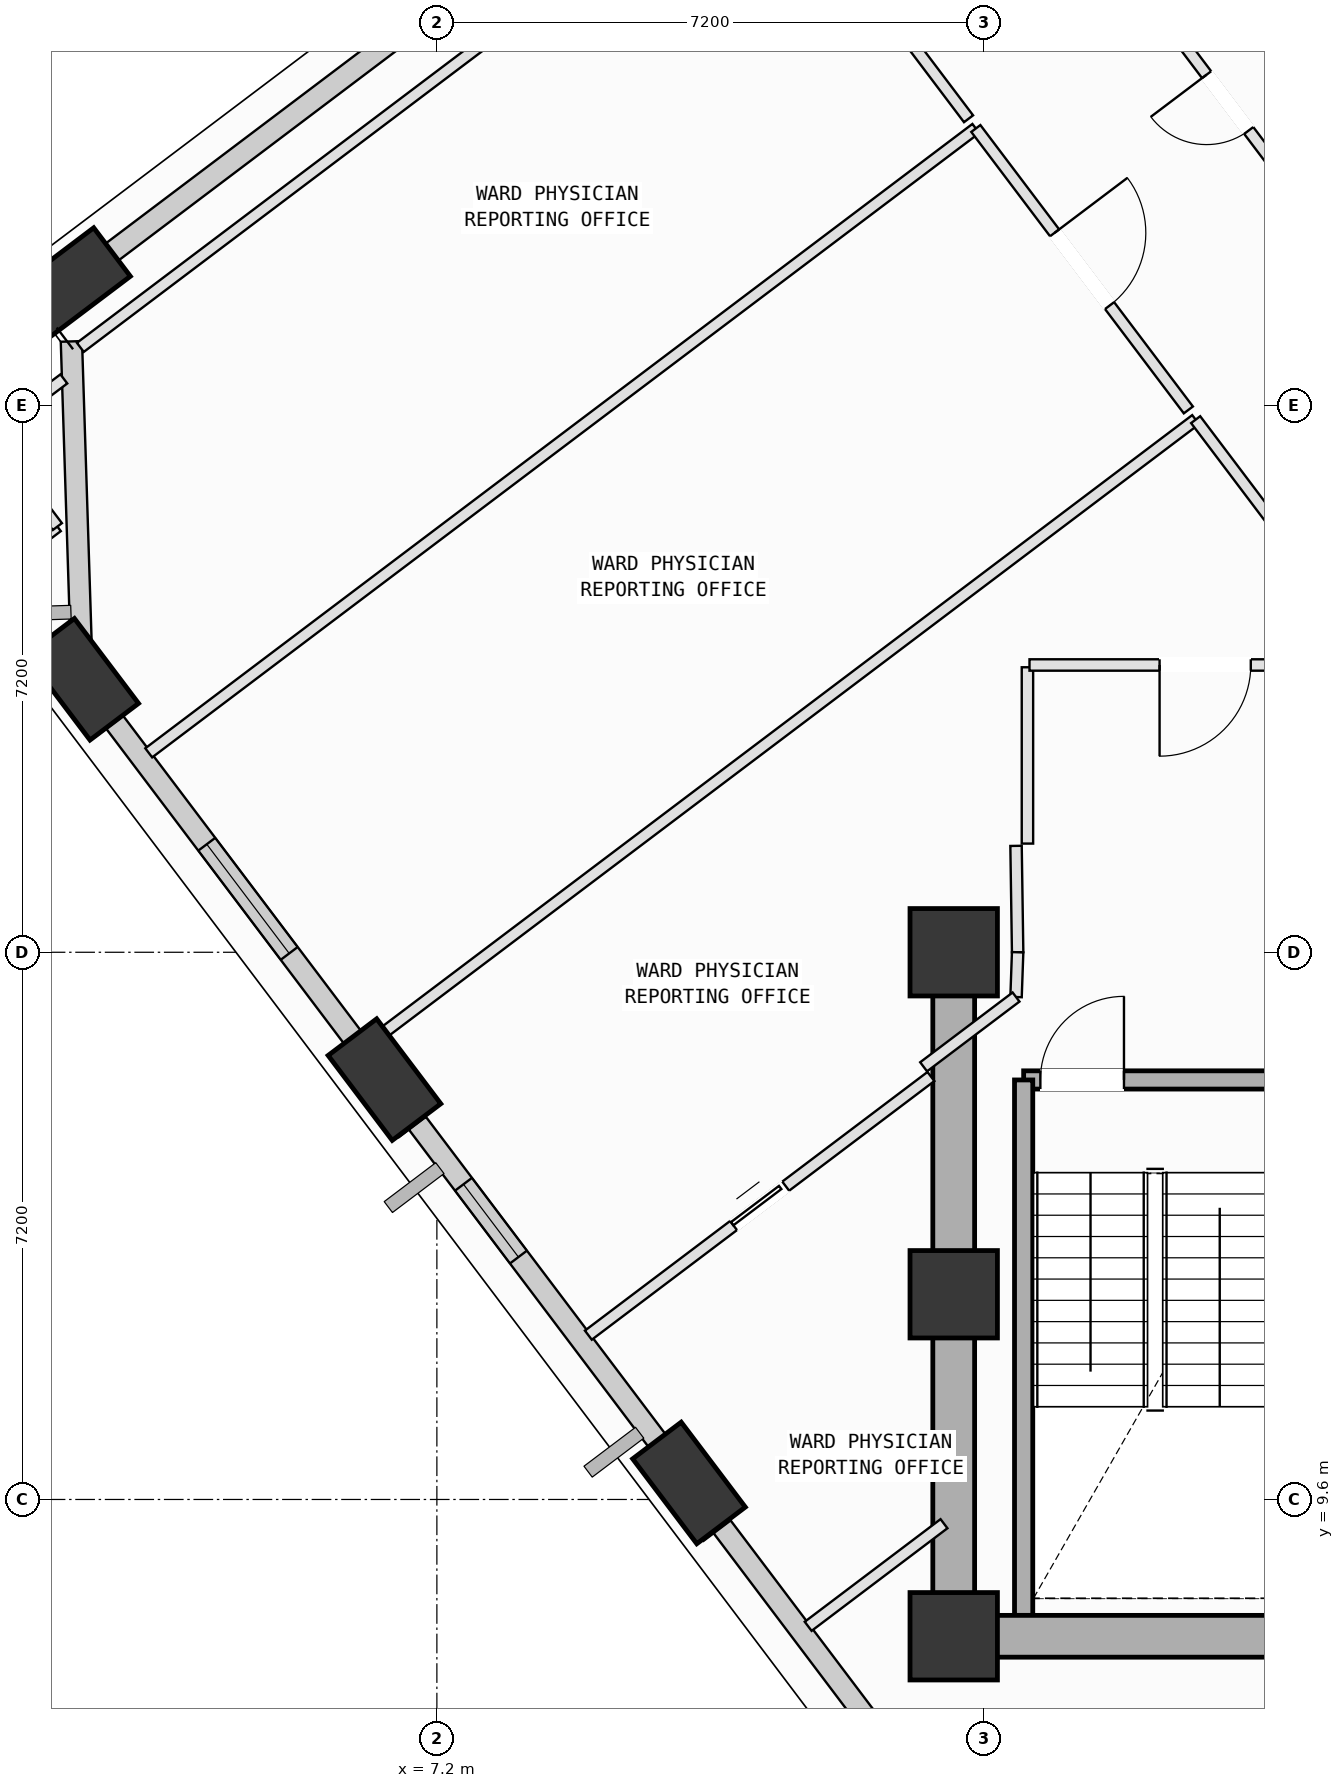
"""IFC4 building model, lengths in metres.
Left out: names, types, materials, properties, quantities, classifications, styles, units other than length and angle.
Written with IfcOpenShell. Run it as: python <this file> out.ifc"""

import sys

from ifc_helpers import new_model, si_unit, direction, frame, frame_2d, origin, origin_2d, place, context, subcontext, project, spatial, rectangle, extrude, element, fill, save


model = new_model("IFC4")
c1 = context("Model", 3, precision=1e-05, world=origin(), true_north=direction((0.0, 1.0)))
c2 = subcontext(c1, "Body", "Model", "MODEL_VIEW")
j1 = project(units=[si_unit("LENGTHUNIT", "METRE"), si_unit("PLANEANGLEUNIT", "RADIAN")], contexts=[c1])
p1 = place(None, origin())
s1 = spatial("IfcSite", under=j1, at=p1, CompositionType="ELEMENT")
p2 = place(p1, origin())
s2 = spatial("IfcBuilding", under=s1, at=p2, CompositionType="ELEMENT")
p3 = place(p2, frame((0.0, 0.0, 181.8)))
s3 = spatial("IfcBuildingStorey", under=s2, at=p3, CompositionType="ELEMENT", Elevation=181.8)
for number, where, z_axis, x_axis in (
    (1, (14.0, 7.8, 0.0), (0.0, 0.0, 1.0), (1.0, 0.0, 0.0)),
    (2, (14.0, 12.3, 0.0), (0.0, 0.0, 1.0), (1.0, 0.0, 0.0)),
    (3, (14.0, 16.8, 0.0), (0.0, 0.0, 1.0), (1.0, 0.0, 0.0)),
):
    element("IfcColumn", number, at=place(p3, frame(where, z_axis=z_axis, x_axis=x_axis)), inside=s3, PredefinedType="COLUMN", context=c2, shape_type="SweptSolid", body=[
        extrude(rectangle(XDim=1.15, YDim=1.15, at=origin_2d()), origin(), (0.0, 0.0, 1.0), 4.0),
    ])
p4 = place(p3, frame((2.367, 25.592, 0.002), z_axis=(-0.002181074788, -0.128380485457, 0.991722589168), x_axis=(0.808144834717, 0.583881033112, 0.077361911126)))
e4 = element("IfcColumn", 4, at=p4, inside=s3, PredefinedType="COLUMN", context=c2, shape_type="SweptSolid", body=[
    extrude(rectangle(XDim=1.4, YDim=0.8, at=origin_2d()), origin(), (0.0, 0.0, 1.0), 4.03),
])
p5 = place(p3, frame((2.534, 20.392, 0.002), z_axis=(0.019204163449, -0.127522915018, 0.991649689281), x_axis=(-0.713651640755, 0.692898113321, 0.102924925082)))
e5 = element("IfcColumn", 5, at=p5, inside=s3, PredefinedType="COLUMN", context=c2, shape_type="SweptSolid", body=[
    extrude(rectangle(XDim=1.4, YDim=0.8, at=origin_2d()), origin(), (0.0, 0.0, 1.0), 4.03),
])
p6 = place(p3, frame((6.51, 15.125, 0.002), z_axis=(0.040764575419, -0.111131997272, 0.992969248554), x_axis=(-0.838574209491, 0.536533215554, 0.094474355164)))
e6 = element("IfcColumn", 6, at=p6, inside=s3, PredefinedType="COLUMN", context=c2, shape_type="SweptSolid", body=[
    extrude(rectangle(XDim=1.4, YDim=0.8, at=origin_2d()), origin(), (0.0, 0.0, 1.0), 4.025),
])
p7 = place(p3, frame((10.517, 9.817, 0.002), z_axis=(0.062518185007, -0.094566341982, 0.993553563482), x_axis=(-0.939913893398, 0.329204870009, 0.090476663063)))
e7 = element("IfcColumn", 7, at=p7, inside=s3, PredefinedType="COLUMN", context=c2, shape_type="SweptSolid", body=[
    extrude(rectangle(XDim=1.4, YDim=0.8, at=origin_2d()), origin(), (0.0, 0.0, 1.0), 4.022),
])
p8 = place(p3, frame((16.791, 32.892, 0.0), z_axis=(0.0, 0.0, 1.0), x_axis=(0.602494608464, -0.798122952165, 0.0)))
e8 = element("IfcWall", 8, at=p8, inside=s3, PredefinedType="SOLIDWALL", context=c2, shape_type="SweptSolid", body=[
    extrude(rectangle(XDim=6.96, YDim=0.24, at=frame_2d((3.48, 0.0))), origin(), (0.0, 0.0, 1.0), 3.265),
])
p9 = place(p8, frame((3.82, 0.0, 0.0)))
e9 = element("IfcOpeningElement", 9, at=p9, cuts=e8, PredefinedType="OPENING", context=c2, shape_type="SweptSolid", body=[
    extrude(rectangle(XDim=1.1, YDim=2.15, at=frame_2d((0.55, 1.075))), frame((0.0, 0.13, 0.0), z_axis=(0.0, -1.0, 0.0), x_axis=(1.0, 0.0, 0.0)), (0.0, 0.0, 1.0), 0.26),
])
p10 = place(p3, frame((2.601, 25.768, 0.0), z_axis=(0.0, 0.0, 1.0), x_axis=(0.798118156469, 0.602500961256, 0.0)))
e10 = element("IfcWall", 10, at=p10, inside=s3, PredefinedType="SOLIDWALL", context=c2, shape_type="SweptSolid", body=[
    extrude(rectangle(XDim=7.27, YDim=0.28, at=frame_2d((3.635, 0.0))), origin(), (0.0, 0.0, 1.0), 3.265),
])
p11 = place(p3, frame((2.526, 20.629, 0.0), z_axis=(0.0, 0.0, 1.0), x_axis=(-0.031949799886, 0.999489474826, 0.0)))
e11 = element("IfcWall", 11, at=p11, inside=s3, PredefinedType="SOLIDWALL", context=c2, shape_type="SweptSolid", body=[
    extrude(rectangle(XDim=4.21, YDim=0.28, at=frame_2d((2.105, 0.0))), origin(), (0.0, 0.0, 1.0), 3.265),
])
p12 = place(p3, frame((6.352, 15.335, 0.0), z_axis=(0.0, 0.0, 1.0), x_axis=(-0.602530491205, 0.798095863395, 0.0)))
e12 = element("IfcWall", 12, at=p12, inside=s3, PredefinedType="SOLIDWALL", context=c2, shape_type="SweptSolid", body=[
    extrude(rectangle(XDim=5.628, YDim=0.28, at=frame_2d((2.814, 0.0))), origin(), (0.0, 0.0, 1.0), 3.265),
])
p13 = place(p12, frame((1.817, 0.0, 0.75)))
e13 = element("IfcOpeningElement", 13, at=p13, cuts=e12, PredefinedType="OPENING", context=c2, shape_type="SweptSolid", body=[
    extrude(rectangle(XDim=1.8, YDim=2.05, at=frame_2d((0.9, 1.025))), frame((0.0, 0.15, 0.0), z_axis=(0.0, -1.0, 0.0), x_axis=(1.0, 0.0, 0.0)), (0.0, 0.0, 1.0), 0.3),
])
p14 = place(p3, frame((10.355, 10.031, 0.0), z_axis=(0.0, 0.0, 1.0), x_axis=(-0.602494498612, 0.79812303509, 0.0)))
e14 = element("IfcWall", 14, at=p14, inside=s3, PredefinedType="SOLIDWALL", context=c2, shape_type="SweptSolid", body=[
    extrude(rectangle(XDim=5.662, YDim=0.28, at=frame_2d((2.831, 0.0))), origin(), (0.0, 0.0, 1.0), 3.265),
])
p15 = place(p14, frame((3.456, 0.0, 0.75)))
e15 = element("IfcOpeningElement", 15, at=p15, cuts=e14, PredefinedType="OPENING", context=c2, shape_type="SweptSolid", body=[
    extrude(rectangle(XDim=1.2, YDim=1.75, at=frame_2d((0.6, 0.875))), frame((0.0, 0.15, 0.0), z_axis=(0.0, -1.0, 0.0), x_axis=(1.0, 0.0, 0.0)), (0.0, 0.0, 1.0), 0.3),
])
p16 = place(p3, frame((15.388, 3.365, 0.0), z_axis=(0.0, 0.0, 1.0), x_axis=(-0.602528511306, 0.798097358136, 0.0)))
e16 = element("IfcWall", 16, at=p16, inside=s3, PredefinedType="SOLIDWALL", context=c2, shape_type="SweptSolid", body=[
    extrude(rectangle(XDim=7.36, YDim=0.28, at=frame_2d((3.68, 0.0))), origin(), (0.0, 0.0, 1.0), 3.065),
])
p17 = place(p16, frame((2.514, 0.0, 0.75)))
e17 = element("IfcOpeningElement", 17, at=p17, cuts=e16, PredefinedType="OPENING", context=c2, shape_type="SweptSolid", body=[
    extrude(rectangle(XDim=1.6, YDim=1.95, at=frame_2d((0.8, 0.975))), frame((0.0, 0.15, 0.0), z_axis=(0.0, -1.0, 0.0), x_axis=(1.0, 0.0, 0.0)), (0.0, 0.0, 1.0), 0.3),
])
p18 = place(p3, frame((14.92, 15.12, 0.0), z_axis=(0.0, 0.0, 1.0), x_axis=(1.0, 0.0, 0.0)))
e18 = element("IfcWall", 18, at=p18, inside=s3, PredefinedType="SOLIDWALL", context=c2, shape_type="SweptSolid", body=[
    extrude(rectangle(XDim=3.46, YDim=0.24, at=frame_2d((1.73, 0.0))), origin(), (0.0, 0.0, 1.0), 3.78),
])
p19 = place(p18, frame((0.22, 0.0, 0.0)))
e19 = element("IfcOpeningElement", 19, at=p19, cuts=e18, PredefinedType="OPENING", context=c2, shape_type="SweptSolid", body=[
    extrude(rectangle(XDim=1.1, YDim=2.15, at=frame_2d((0.55, 1.075))), frame((0.0, 0.13, 0.0), z_axis=(0.0, -1.0, 0.0), x_axis=(1.0, 0.0, 0.0)), (0.0, 0.0, 1.0), 0.26),
])
p20 = place(p3, frame((14.92, 8.075, 0.0), z_axis=(0.0, 0.0, 1.0), x_axis=(0.0, 1.0, 0.0)))
e20 = element("IfcWall", 20, at=p20, inside=s3, PredefinedType="SOLIDWALL", context=c2, shape_type="SweptSolid", body=[
    extrude(rectangle(XDim=7.045, YDim=0.24, at=frame_2d((3.522, 0.0))), origin(), (0.0, 0.0, 1.0), 3.78),
])
p21 = place(p3, frame((14.0, 7.8, 0.0), z_axis=(0.0, 0.0, 1.0), x_axis=(1.0, 0.0, 0.0)))
e21 = element("IfcWall", 21, at=p21, inside=s3, PredefinedType="SHEAR", context=c2, shape_type="SweptSolid", body=[
    extrude(rectangle(XDim=10.8, YDim=0.55, at=frame_2d((5.4, 0.0))), origin(), (0.0, 0.0, 1.0), 3.78),
])
p22 = place(p3, frame((14.0, 16.8, 0.0), z_axis=(0.0, 0.0, 1.0), x_axis=(0.0, -1.0, 0.0)))
e22 = element("IfcWall", 22, at=p22, inside=s3, PredefinedType="SHEAR", context=c2, shape_type="SweptSolid", body=[
    extrude(rectangle(XDim=9.0, YDim=0.55, at=frame_2d((4.5, 0.0))), origin(), (0.0, 0.0, 1.0), 3.78),
])
p23 = place(p3, frame((12.085, 7.931, 0.0), z_axis=(0.0, 0.0, 1.0), x_axis=(0.79790227483, 0.602786827843, 0.0)))
e23 = element("IfcWall", 23, at=p23, inside=s3, PredefinedType="PARTITIONING", context=c2, shape_type="SweptSolid", body=[
    extrude(rectangle(XDim=2.24, YDim=0.15, at=frame_2d((1.12, 0.0))), origin(), (0.0, 0.0, 1.0), 3.78),
])
p24 = place(p3, frame((10.769, 9.101, 0.0), z_axis=(0.0, 0.0, 1.0), x_axis=(-0.601888920392, 0.798579819122, 0.0)))
e24 = element("IfcWall", 24, at=p24, inside=s3, PredefinedType="PARTITIONING", context=c2, shape_type="SweptSolid", body=[
    extrude(rectangle(XDim=0.992, YDim=0.15, at=frame_2d((0.496, 0.0))), origin(), (0.0, 0.0, 1.0), 3.265),
])
p25 = place(p3, frame((9.193, 11.762, 0.0), z_axis=(0.0, 0.0, 1.0), x_axis=(0.798045187467, 0.602597609323, 0.0)))
e25 = element("IfcWall", 25, at=p25, inside=s3, PredefinedType="PARTITIONING", context=c2, shape_type="SweptSolid", body=[
    extrude(rectangle(XDim=5.647, YDim=0.15, at=frame_2d((2.824, 0.0))), origin(), (0.0, 0.0, 1.0), 3.78),
])
p26 = place(p25, frame((2.394, 0.0, 0.0)))
e26 = element("IfcOpeningElement", 26, at=p26, cuts=e25, PredefinedType="OPENING", context=c2, shape_type="SweptSolid", body=[
    extrude(rectangle(XDim=0.86, YDim=2.06, at=frame_2d((0.43, 1.03))), frame((0.0, 0.085, 0.0), z_axis=(0.0, -1.0, 0.0), x_axis=(1.0, 0.0, 0.0)), (0.0, 0.0, 1.0), 0.17),
])
p27 = place(p3, frame((14.97, 20.55, 0.0), z_axis=(0.0, 0.0, 1.0), x_axis=(0.0, -1.0, 0.0)))
e27 = element("IfcWall", 27, at=p27, inside=s3, PredefinedType="PARTITIONING", context=c2, shape_type="SweptSolid", body=[
    extrude(rectangle(XDim=2.32, YDim=0.15, at=frame_2d((1.16, 0.0))), origin(), (0.0, 0.0, 1.0), 3.78),
])
p28 = place(p3, frame((14.82, 18.2, 0.0), z_axis=(0.0, 0.0, 1.0), x_axis=(0.01499656939, -0.99988754513, 0.0)))
e28 = element("IfcWall", 28, at=p28, inside=s3, PredefinedType="PARTITIONING", context=c2, shape_type="SweptSolid", body=[
    extrude(rectangle(XDim=1.4, YDim=0.15, at=frame_2d((0.7, 0.0))), origin(), (0.0, 0.0, 1.0), 3.78),
])
p29 = place(p3, frame((14.841, 16.8, 0.0), z_axis=(0.0, 0.0, 1.0), x_axis=(-0.035617667676, -0.999365489573, 0.0)))
e29 = element("IfcWall", 29, at=p29, inside=s3, PredefinedType="PARTITIONING", context=c2, shape_type="SweptSolid", body=[
    extrude(rectangle(XDim=0.59, YDim=0.15, at=frame_2d((0.295, 0.0))), origin(), (0.0, 0.0, 1.0), 3.78),
])
p30 = place(p3, frame((14.82, 16.211, 0.0), z_axis=(0.0, 0.0, 1.0), x_axis=(-0.798130998248, -0.602483949691, 0.0)))
e30 = element("IfcWall", 30, at=p30, inside=s3, PredefinedType="PARTITIONING", context=c2, shape_type="SweptSolid", body=[
    extrude(rectangle(XDim=1.524, YDim=0.15, at=frame_2d((0.762, 0.0))), origin(), (0.0, 0.0, 1.0), 3.78),
])
p31 = place(p3, frame((6.76, 14.412, 0.0), z_axis=(0.0, 0.0, 1.0), x_axis=(-0.602660806532, 0.797997463824, 0.0)))
e31 = element("IfcWall", 31, at=p31, inside=s3, PredefinedType="PARTITIONING", context=c2, shape_type="SweptSolid", body=[
    extrude(rectangle(XDim=0.982, YDim=0.15, at=frame_2d((0.491, 0.0))), origin(), (0.0, 0.0, 1.0), 3.265),
])
p32 = place(p3, frame((6.301, 15.593, 0.0), z_axis=(0.0, 0.0, 1.0), x_axis=(0.798111656514, 0.60250957149, 0.0)))
e32 = element("IfcWall", 32, at=p32, inside=s3, PredefinedType="PARTITIONING", context=c2, shape_type="SweptSolid", body=[
    extrude(rectangle(XDim=13.635, YDim=0.15, at=frame_2d((6.817, 0.0))), origin(), (0.0, 0.0, 1.0), 3.78),
])
p33 = place(p3, frame((17.183, 23.808, 0.0), z_axis=(0.0, 0.0, 1.0), x_axis=(0.602527348014, -0.798098236369, 0.0)))
e33 = element("IfcWall", 33, at=p33, inside=s3, PredefinedType="PARTITIONING", context=c2, shape_type="SweptSolid", body=[
    extrude(rectangle(XDim=4.045, YDim=0.15, at=frame_2d((2.022, 0.0))), origin(), (0.0, 0.0, 1.0), 3.78),
])
p34 = place(p3, frame((19.62, 20.58, 0.0), z_axis=(0.0, 0.0, 1.0), x_axis=(-1.0, 0.0, 0.0)))
e34 = element("IfcWall", 34, at=p34, inside=s3, PredefinedType="PARTITIONING", context=c2, shape_type="SweptSolid", body=[
    extrude(rectangle(XDim=4.623, YDim=0.15, at=frame_2d((2.312, 0.0))), origin(), (0.0, 0.0, 1.0), 3.78),
])
p35 = place(p34, frame((1.711, 0.0, 0.0)))
e35 = element("IfcOpeningElement", 35, at=p35, cuts=e34, PredefinedType="OPENING", context=c2, shape_type="SweptSolid", body=[
    extrude(rectangle(XDim=1.2, YDim=2.15, at=frame_2d((0.6, 1.075))), frame((0.0, 0.085, 0.0), z_axis=(0.0, -1.0, 0.0), x_axis=(1.0, 0.0, 0.0)), (0.0, 0.0, 1.0), 0.17),
])
p36 = place(p3, frame((3.409, 19.424, 0.0), z_axis=(0.0, 0.0, 1.0), x_axis=(0.798120266847, 0.60249816568, 0.0)))
e36 = element("IfcWall", 36, at=p36, inside=s3, PredefinedType="PARTITIONING", context=c2, shape_type="SweptSolid", body=[
    extrude(rectangle(XDim=13.635, YDim=0.15, at=frame_2d((6.817, 0.0))), origin(), (0.0, 0.0, 1.0), 3.78),
])
p37 = place(p3, frame((14.291, 27.639, 0.0), z_axis=(0.0, 0.0, 1.0), x_axis=(0.602581465391, -0.798057377365, 0.0)))
e37 = element("IfcWall", 37, at=p37, inside=s3, PredefinedType="PARTITIONING", context=c2, shape_type="SweptSolid", body=[
    extrude(rectangle(XDim=4.64, YDim=0.15, at=frame_2d((2.32, 0.0))), origin(), (0.0, 0.0, 1.0), 3.78),
])
p38 = place(p37, frame((1.72, 0.0, 0.0)))
e38 = element("IfcOpeningElement", 38, at=p38, cuts=e37, PredefinedType="OPENING", context=c2, shape_type="SweptSolid", body=[
    extrude(rectangle(XDim=1.2, YDim=2.15, at=frame_2d((0.6, 1.075))), frame((0.0, 0.085, 0.0), z_axis=(0.0, -1.0, 0.0), x_axis=(1.0, 0.0, 0.0)), (0.0, 0.0, 1.0), 0.17),
])
p39 = place(p3, frame((11.399, 31.47, 0.0), z_axis=(0.0, 0.0, 1.0), x_axis=(0.602614975976, -0.798032073747, 0.0)))
e39 = element("IfcWall", 39, at=p39, inside=s3, PredefinedType="PARTITIONING", context=c2, shape_type="SweptSolid", body=[
    extrude(rectangle(XDim=4.64, YDim=0.15, at=frame_2d((2.32, 0.0))), origin(), (0.0, 0.0, 1.0), 3.78),
])
p40 = place(p39, frame((1.72, 0.0, 0.0)))
e40 = element("IfcOpeningElement", 40, at=p40, cuts=e39, PredefinedType="OPENING", context=c2, shape_type="SweptSolid", body=[
    extrude(rectangle(XDim=1.2, YDim=2.15, at=frame_2d((0.6, 1.075))), frame((0.0, 0.085, 0.0), z_axis=(0.0, -1.0, 0.0), x_axis=(1.0, 0.0, 0.0)), (0.0, 0.0, 1.0), 0.17),
])
p41 = place(p3, frame((2.777, 19.688, 0.0), z_axis=(0.0, 0.0, 1.0), x_axis=(-0.602426797269, 0.798174137599, 0.0)))
e41 = element("IfcWall", 41, at=p41, inside=s3, PredefinedType="PARTITIONING", context=c2, shape_type="SweptSolid", body=[
    extrude(rectangle(XDim=2.508, YDim=0.15, at=frame_2d((1.254, 0.0))), origin(), (0.0, 0.0, 1.0), 3.265),
])
p42 = place(p3, frame((1.266, 21.69, 0.0), z_axis=(0.0, 0.0, 1.0), x_axis=(0.797858472896, 0.6028448036, 0.0)))
e42 = element("IfcWall", 42, at=p42, inside=s3, PredefinedType="PARTITIONING", context=c2, shape_type="SweptSolid", body=[
    extrude(rectangle(XDim=1.179, YDim=0.15, at=frame_2d((0.59, 0.0))), origin(), (0.0, 0.0, 1.0), 3.78),
])
p43 = place(p3, frame((2.207, 22.401, 0.0), z_axis=(0.0, 0.0, 1.0), x_axis=(-0.602264019624, 0.79829696897, 0.0)))
e43 = element("IfcWall", 43, at=p43, inside=s3, PredefinedType="PARTITIONING", context=c2, shape_type="SweptSolid", body=[
    extrude(rectangle(XDim=1.5, YDim=0.15, at=frame_2d((0.75, 0.0))), origin(), (0.0, 0.0, 1.0), 3.78),
])
p44 = place(p3, frame((1.304, 23.598, 0.0), z_axis=(0.0, 0.0, 1.0), x_axis=(0.79803169235, 0.602615481053, 0.0)))
e44 = element("IfcWall", 44, at=p44, inside=s3, PredefinedType="PARTITIONING", context=c2, shape_type="SweptSolid", body=[
    extrude(rectangle(XDim=1.238, YDim=0.15, at=frame_2d((0.619, 0.0))), origin(), (0.0, 0.0, 1.0), 3.78),
])
p45 = place(p3, frame((2.509, 24.759, 0.0), z_axis=(0.0, 0.0, 1.0), x_axis=(0.798120739774, 0.6024975392, 0.0)))
e45 = element("IfcWall", 45, at=p45, inside=s3, PredefinedType="PARTITIONING", context=c2, shape_type="SweptSolid", body=[
    extrude(rectangle(XDim=11.138, YDim=0.15, at=frame_2d((5.569, 0.0))), origin(), (0.0, 0.0, 1.0), 3.265),
])
p46 = place(p3, frame((17.994, 29.39, 0.0), z_axis=(0.0, 0.0, 1.0), x_axis=(0.602432799865, -0.798169607068, 0.0)))
e46 = element("IfcWall", 46, at=p46, inside=s3, PredefinedType="PARTITIONING", context=c2, shape_type="SweptSolid", body=[
    extrude(rectangle(XDim=1.7, YDim=0.15, at=frame_2d((0.85, 0.0))), origin(), (0.0, 0.0, 1.0), 3.78),
])
p47 = place(p3, frame((19.15, 25.933, 0.0), z_axis=(0.0, 0.0, 1.0), x_axis=(-0.602532763548, 0.798094147862, 0.0)))
e47 = element("IfcWall", 47, at=p47, inside=s3, PredefinedType="PARTITIONING", context=c2, shape_type="SweptSolid", body=[
    extrude(rectangle(XDim=5.13, YDim=0.15, at=frame_2d((2.565, 0.0))), origin(), (0.0, 0.0, 1.0), 3.78),
])
p48 = place(p47, frame((2.105, 0.0, 0.0)))
e48 = element("IfcOpeningElement", 48, at=p48, cuts=e47, PredefinedType="OPENING", context=c2, shape_type="SweptSolid", body=[
    extrude(rectangle(XDim=0.92, YDim=2.1, at=frame_2d((0.46, 1.05))), frame((0.0, 0.085, 0.0), z_axis=(0.0, -1.0, 0.0), x_axis=(1.0, 0.0, 0.0)), (0.0, 0.0, 1.0), 0.17),
])
p49 = place(p13, origin())
e49 = element("IfcWindow", 49, at=p49, inside=s3, PartitioningType="SINGLE_PANEL", PredefinedType="WINDOW", context=c2, shape_type="SweptSolid", body=[
    extrude(rectangle(XDim=1.8, YDim=2.05, at=frame_2d((0.9, 1.025))), frame((0.0, 0.03, 0.0), z_axis=(0.0, -1.0, 0.0), x_axis=(1.0, 0.0, 0.0)), (0.0, 0.0, 1.0), 0.06),
])
fill(e13, e49)
p50 = place(p15, origin())
e50 = element("IfcWindow", 50, at=p50, inside=s3, PartitioningType="SINGLE_PANEL", PredefinedType="WINDOW", context=c2, shape_type="SweptSolid", body=[
    extrude(rectangle(XDim=1.2, YDim=1.75, at=frame_2d((0.6, 0.875))), frame((0.0, 0.03, 0.0), z_axis=(0.0, -1.0, 0.0), x_axis=(1.0, 0.0, 0.0)), (0.0, 0.0, 1.0), 0.06),
])
fill(e15, e50)
p51 = place(p19, origin())
e51 = element("IfcDoor", 51, at=p51, inside=s3, OperationType="SINGLE_SWING_RIGHT", PredefinedType="DOOR", context=c2, shape_type="SweptSolid", body=[
    extrude(rectangle(XDim=1.1, YDim=2.15, at=frame_2d((0.55, 1.075))), frame((0.0, 0.025, 0.0), z_axis=(0.0, -1.0, 0.0), x_axis=(1.0, 0.0, 0.0)), (0.0, 0.0, 1.0), 0.05),
])
fill(e19, e51)
p52 = place(p35, origin())
e52 = element("IfcDoor", 52, at=p52, inside=s3, OperationType="SINGLE_SWING_RIGHT", PredefinedType="DOOR", context=c2, shape_type="SweptSolid", body=[
    extrude(rectangle(XDim=1.2, YDim=2.15, at=frame_2d((0.6, 1.075))), frame((0.0, 0.025, 0.0), z_axis=(0.0, -1.0, 0.0), x_axis=(1.0, 0.0, 0.0)), (0.0, 0.0, 1.0), 0.05),
])
fill(e35, e52)
p53 = place(p38, origin())
e53 = element("IfcDoor", 53, at=p53, inside=s3, OperationType="SINGLE_SWING_LEFT", PredefinedType="DOOR", context=c2, shape_type="SweptSolid", body=[
    extrude(rectangle(XDim=1.2, YDim=2.15, at=frame_2d((0.6, 1.075))), frame((0.0, 0.025, 0.0), z_axis=(0.0, -1.0, 0.0), x_axis=(1.0, 0.0, 0.0)), (0.0, 0.0, 1.0), 0.05),
])
fill(e38, e53)
p54 = place(p48, origin())
e54 = element("IfcDoor", 54, at=p54, inside=s3, OperationType="SINGLE_SWING_RIGHT", PredefinedType="DOOR", context=c2, shape_type="SweptSolid", body=[
    extrude(rectangle(XDim=0.92, YDim=2.1, at=frame_2d((0.46, 1.05))), frame((0.0, 0.025, 0.0), z_axis=(0.0, -1.0, 0.0), x_axis=(1.0, 0.0, 0.0)), (0.0, 0.0, 1.0), 0.05),
])
fill(e48, e54)
p55 = place(p26, origin())
e55 = element("IfcDoor", 55, at=p55, inside=s3, OperationType="SLIDING_TO_LEFT", PredefinedType="DOOR", context=c2, shape_type="SweptSolid", body=[
    extrude(rectangle(XDim=0.86, YDim=2.06, at=frame_2d((0.43, 1.03))), frame((0.0, 0.025, 0.0), z_axis=(0.0, -1.0, 0.0), x_axis=(1.0, 0.0, 0.0)), (0.0, 0.0, 1.0), 0.05),
])
fill(e26, e55)
save(model, sys.argv[1])
